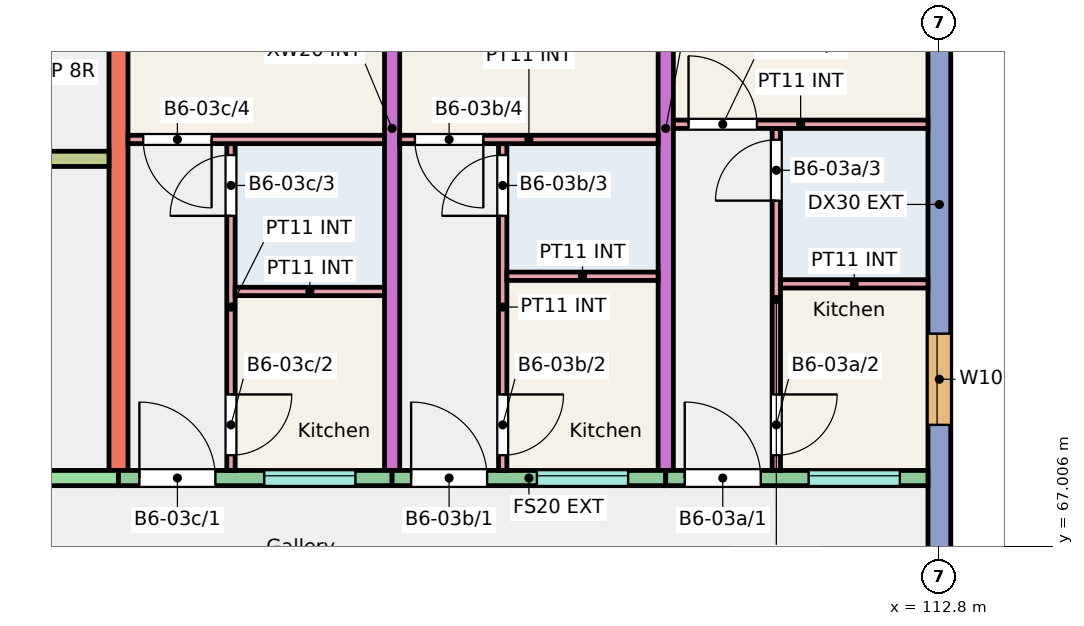
"""IFC4 building model, lengths in metres.
Left out: names, types, materials, properties, quantities, classifications, styles, units other than length and angle.
Written with IfcOpenShell. Run it as: python <this file> out.ifc"""

import sys

from ifc_helpers import new_model, si_unit, direction, frame, frame_2d, origin, place, context, subcontext, project, spatial, rectangle, extrude, element, fill, save


model = new_model("IFC4")
c1 = context("Model", 3, precision=1e-05, world=origin(), true_north=direction((0.0, 1.0)))
c2 = subcontext(c1, "Body", "Model", "MODEL_VIEW")
j1 = project(units=[si_unit("LENGTHUNIT", "METRE"), si_unit("PLANEANGLEUNIT", "RADIAN")], contexts=[c1])
p1 = place(None, origin())
s1 = spatial("IfcSite", under=j1, at=p1, CompositionType="ELEMENT")
p2 = place(p1, origin())
s2 = spatial("IfcBuilding", under=s1, at=p2, CompositionType="ELEMENT")
p3 = place(p2, frame((0.0, 0.0, 9.0)))
s3 = spatial("IfcBuildingStorey", under=s2, at=p3, CompositionType="ELEMENT", Elevation=9.0)
p4 = place(p3, frame((102.0, 68.0, 0.0), z_axis=(0.0, 0.0, 1.0), x_axis=(0.0, 1.0, 0.0)))
e1 = element("IfcWall", 1, at=p4, inside=s3, PredefinedType="SHEAR", context=c2, shape_type="SweptSolid", body=[
    extrude(rectangle(XDim=9.0, YDim=0.25, at=frame_2d((4.5, 0.0))), origin(), (0.0, 0.0, 1.0), 3.0),
])
for number, where, z_axis, x_axis in (
    (2, (105.6, 68.0, 0.0), (0.0, 0.0, 1.0), (0.0, 1.0, 0.0)),
    (3, (109.2, 68.0, 0.0), (0.0, 0.0, 1.0), (0.0, 1.0, 0.0)),
):
    element("IfcWall", number, at=place(p3, frame(where, z_axis=z_axis, x_axis=x_axis)), inside=s3, PredefinedType="SHEAR", context=c2, shape_type="SweptSolid", body=[
        extrude(rectangle(XDim=9.0, YDim=0.2, at=frame_2d((4.5, 0.0))), origin(), (0.0, 0.0, 1.0), 3.0),
    ])
p5 = place(p3, frame((112.8, 66.0, 0.0), z_axis=(0.0, 0.0, 1.0), x_axis=(0.0, 1.0, 0.0)))
e4 = element("IfcWall", 4, at=p5, inside=s3, PredefinedType="SHEAR", context=c2, shape_type="SweptSolid", body=[
    extrude(rectangle(XDim=11.0, YDim=0.3, at=frame_2d((5.5, 0.0))), origin(), (0.0, 0.0, 1.0), 3.0),
])
p6 = place(p5, frame((2.6, 0.0, 0.9)))
e5 = element("IfcOpeningElement", 5, at=p6, cuts=e4, PredefinedType="OPENING", context=c2, shape_type="SweptSolid", body=[
    extrude(rectangle(XDim=1.2, YDim=1.5, at=frame_2d((0.6, 0.75))), frame((0.0, 0.16, 0.0), z_axis=(0.0, -1.0, 0.0), x_axis=(1.0, 0.0, 0.0)), (0.0, 0.0, 1.0), 0.32),
])
p7 = place(p5, frame((7.905, 0.0, 0.9)))
e6 = element("IfcOpeningElement", 6, at=p7, cuts=e4, PredefinedType="OPENING", context=c2, shape_type="SweptSolid", body=[
    extrude(rectangle(XDim=1.8, YDim=1.5, at=frame_2d((0.9, 0.75))), frame((0.0, 0.16, 0.0), z_axis=(0.0, -1.0, 0.0), x_axis=(1.0, 0.0, 0.0)), (0.0, 0.0, 1.0), 0.32),
])
p8 = place(p3, frame((96.15, 67.9, 0.0), z_axis=(0.0, 0.0, 1.0), x_axis=(1.0, 0.0, 0.0)))
e7 = element("IfcWall", 7, at=p8, inside=s3, PredefinedType="SHEAR", context=c2, shape_type="SweptSolid", body=[
    extrude(rectangle(XDim=5.85, YDim=0.2, at=frame_2d((2.925, 0.0))), origin(), (0.0, 0.0, 1.0), 3.0),
])
p9 = place(p8, frame((2.312, 0.0, 0.0)))
e8 = element("IfcOpeningElement", 8, at=p9, cuts=e7, PredefinedType="OPENING", context=c2, shape_type="SweptSolid", body=[
    extrude(rectangle(XDim=1.1, YDim=2.1, at=frame_2d((0.55, 1.05))), frame((0.0, 0.11, 0.0), z_axis=(0.0, -1.0, 0.0), x_axis=(1.0, 0.0, 0.0)), (0.0, 0.0, 1.0), 0.22),
])
p10 = place(p3, frame((96.15, 72.1, 0.0), z_axis=(0.0, 0.0, 1.0), x_axis=(1.0, 0.0, 0.0)))
e9 = element("IfcWall", 9, at=p10, inside=s3, PredefinedType="SHEAR", context=c2, shape_type="SweptSolid", body=[
    extrude(rectangle(XDim=5.725, YDim=0.2, at=frame_2d((2.863, 0.0))), origin(), (0.0, 0.0, 1.0), 3.0),
])
p11 = place(p10, frame((3.775, 0.0, 0.0)))
e10 = element("IfcOpeningElement", 10, at=p11, cuts=e9, PredefinedType="OPENING", context=c2, shape_type="SweptSolid", body=[
    extrude(rectangle(XDim=1.0, YDim=2.1, at=frame_2d((0.5, 1.05))), frame((0.0, 0.11, 0.0), z_axis=(0.0, -1.0, 0.0), x_axis=(1.0, 0.0, 0.0)), (0.0, 0.0, 1.0), 0.22),
])
p12 = place(p10, frame((0.762, 0.0, 0.0)))
e11 = element("IfcOpeningElement", 11, at=p12, cuts=e9, PredefinedType="OPENING", context=c2, shape_type="SweptSolid", body=[
    extrude(rectangle(XDim=1.1, YDim=2.1, at=frame_2d((0.55, 1.05))), frame((0.0, 0.11, 0.0), z_axis=(0.0, -1.0, 0.0), x_axis=(1.0, 0.0, 0.0)), (0.0, 0.0, 1.0), 0.22),
])
p13 = place(p3, frame((102.0, 67.9, 0.0), z_axis=(0.0, 0.0, 1.0), x_axis=(1.0, 0.0, 0.0)))
e12 = element("IfcWall", 12, at=p13, inside=s3, PredefinedType="SOLIDWALL", context=c2, shape_type="SweptSolid", body=[
    extrude(rectangle(XDim=3.6, YDim=0.2, at=frame_2d((1.8, 0.0))), origin(), (0.0, 0.0, 1.0), 3.0),
])
p14 = place(p13, frame((1.917, 0.0, 1.1)))
e13 = element("IfcOpeningElement", 13, at=p14, cuts=e12, PredefinedType="OPENING", context=c2, shape_type="SweptSolid", body=[
    extrude(rectangle(XDim=1.2, YDim=1.3, at=frame_2d((0.6, 0.65))), frame((0.0, 0.11, 0.0), z_axis=(0.0, -1.0, 0.0), x_axis=(1.0, 0.0, 0.0)), (0.0, 0.0, 1.0), 0.22),
])
p15 = place(p13, frame((0.275, 0.0, 0.0)))
e14 = element("IfcOpeningElement", 14, at=p15, cuts=e12, PredefinedType="OPENING", context=c2, shape_type="SweptSolid", body=[
    extrude(rectangle(XDim=1.0, YDim=2.1, at=frame_2d((0.5, 1.05))), frame((0.0, 0.11, 0.0), z_axis=(0.0, -1.0, 0.0), x_axis=(1.0, 0.0, 0.0)), (0.0, 0.0, 1.0), 0.22),
])
p16 = place(p3, frame((105.6, 67.9, 0.0), z_axis=(0.0, 0.0, 1.0), x_axis=(1.0, 0.0, 0.0)))
e15 = element("IfcWall", 15, at=p16, inside=s3, PredefinedType="SOLIDWALL", context=c2, shape_type="SweptSolid", body=[
    extrude(rectangle(XDim=3.6, YDim=0.2, at=frame_2d((1.8, 0.0))), origin(), (0.0, 0.0, 1.0), 3.0),
])
p17 = place(p16, frame((1.905, 0.0, 1.1)))
e16 = element("IfcOpeningElement", 16, at=p17, cuts=e15, PredefinedType="OPENING", context=c2, shape_type="SweptSolid", body=[
    extrude(rectangle(XDim=1.2, YDim=1.3, at=frame_2d((0.6, 0.65))), frame((0.0, 0.11, 0.0), z_axis=(0.0, -1.0, 0.0), x_axis=(1.0, 0.0, 0.0)), (0.0, 0.0, 1.0), 0.22),
])
p18 = place(p16, frame((0.25, 0.0, 0.0)))
e17 = element("IfcOpeningElement", 17, at=p18, cuts=e15, PredefinedType="OPENING", context=c2, shape_type="SweptSolid", body=[
    extrude(rectangle(XDim=1.0, YDim=2.1, at=frame_2d((0.5, 1.05))), frame((0.0, 0.11, 0.0), z_axis=(0.0, -1.0, 0.0), x_axis=(1.0, 0.0, 0.0)), (0.0, 0.0, 1.0), 0.22),
])
p19 = place(p3, frame((109.2, 67.9, 0.0), z_axis=(0.0, 0.0, 1.0), x_axis=(1.0, 0.0, 0.0)))
e18 = element("IfcWall", 18, at=p19, inside=s3, PredefinedType="SOLIDWALL", context=c2, shape_type="SweptSolid", body=[
    extrude(rectangle(XDim=3.45, YDim=0.2, at=frame_2d((1.725, 0.0))), origin(), (0.0, 0.0, 1.0), 3.0),
])
p20 = place(p19, frame((1.88, 0.0, 1.1)))
e19 = element("IfcOpeningElement", 19, at=p20, cuts=e18, PredefinedType="OPENING", context=c2, shape_type="SweptSolid", body=[
    extrude(rectangle(XDim=1.2, YDim=1.3, at=frame_2d((0.6, 0.65))), frame((0.0, 0.11, 0.0), z_axis=(0.0, -1.0, 0.0), x_axis=(1.0, 0.0, 0.0)), (0.0, 0.0, 1.0), 0.22),
])
p21 = place(p19, frame((0.25, 0.0, 0.0)))
e20 = element("IfcOpeningElement", 20, at=p21, cuts=e18, PredefinedType="OPENING", context=c2, shape_type="SweptSolid", body=[
    extrude(rectangle(XDim=1.0, YDim=2.1, at=frame_2d((0.5, 1.05))), frame((0.0, 0.11, 0.0), z_axis=(0.0, -1.0, 0.0), x_axis=(1.0, 0.0, 0.0)), (0.0, 0.0, 1.0), 0.22),
])
p22 = place(p3, frame((110.655, 68.0, 0.0), z_axis=(0.0, 0.0, 1.0), x_axis=(0.0, 1.0, 0.0)))
e21 = element("IfcWall", 21, at=p22, inside=s3, PredefinedType="PARTITIONING", context=c2, shape_type="SweptSolid", body=[
    extrude(rectangle(XDim=4.5, YDim=0.11, at=frame_2d((2.25, 0.0))), origin(), (0.0, 0.0, 1.0), 2.8),
])
p23 = place(p22, frame((0.2, 0.0, 0.0)))
e22 = element("IfcOpeningElement", 22, at=p23, cuts=e21, PredefinedType="OPENING", context=c2, shape_type="SweptSolid", body=[
    extrude(rectangle(XDim=0.8, YDim=2.1, at=frame_2d((0.4, 1.05))), frame((0.0, 0.065, 0.0), z_axis=(0.0, -1.0, 0.0), x_axis=(1.0, 0.0, 0.0)), (0.0, 0.0, 1.0), 0.13),
])
p24 = place(p22, frame((3.55, 0.0, 0.0)))
e23 = element("IfcOpeningElement", 23, at=p24, cuts=e21, PredefinedType="OPENING", context=c2, shape_type="SweptSolid", body=[
    extrude(rectangle(XDim=0.8, YDim=2.1, at=frame_2d((0.4, 1.05))), frame((0.0, 0.065, 0.0), z_axis=(0.0, -1.0, 0.0), x_axis=(1.0, 0.0, 0.0)), (0.0, 0.0, 1.0), 0.13),
])
p25 = place(p3, frame((110.71, 70.455, 0.0), z_axis=(0.0, 0.0, 1.0), x_axis=(1.0, 0.0, 0.0)))
e24 = element("IfcWall", 24, at=p25, inside=s3, PredefinedType="PARTITIONING", context=c2, shape_type="SweptSolid", body=[
    extrude(rectangle(XDim=1.94, YDim=0.11, at=frame_2d((0.97, 0.0))), origin(), (0.0, 0.0, 1.0), 2.8),
])
p26 = place(p3, frame((109.3, 72.555, 0.0), z_axis=(0.0, 0.0, 1.0), x_axis=(1.0, 0.0, 0.0)))
e25 = element("IfcWall", 25, at=p26, inside=s3, PredefinedType="PARTITIONING", context=c2, shape_type="SweptSolid", body=[
    extrude(rectangle(XDim=3.35, YDim=0.11, at=frame_2d((1.675, 0.0))), origin(), (0.0, 0.0, 1.0), 2.8),
])
p27 = place(p26, frame((0.2, 0.0, 0.0)))
e26 = element("IfcOpeningElement", 26, at=p27, cuts=e25, PredefinedType="OPENING", context=c2, shape_type="SweptSolid", body=[
    extrude(rectangle(XDim=0.9, YDim=2.1, at=frame_2d((0.45, 1.05))), frame((0.0, 0.065, 0.0), z_axis=(0.0, -1.0, 0.0), x_axis=(1.0, 0.0, 0.0)), (0.0, 0.0, 1.0), 0.13),
])
p28 = place(p3, frame((107.055, 68.0, 0.0), z_axis=(0.0, 0.0, 1.0), x_axis=(0.0, 1.0, 0.0)))
e27 = element("IfcWall", 27, at=p28, inside=s3, PredefinedType="PARTITIONING", context=c2, shape_type="SweptSolid", body=[
    extrude(rectangle(XDim=4.3, YDim=0.11, at=frame_2d((2.15, 0.0))), origin(), (0.0, 0.0, 1.0), 2.8),
])
p29 = place(p28, frame((0.2, 0.0, 0.0)))
e28 = element("IfcOpeningElement", 28, at=p29, cuts=e27, PredefinedType="OPENING", context=c2, shape_type="SweptSolid", body=[
    extrude(rectangle(XDim=0.8, YDim=2.1, at=frame_2d((0.4, 1.05))), frame((0.0, 0.065, 0.0), z_axis=(0.0, -1.0, 0.0), x_axis=(1.0, 0.0, 0.0)), (0.0, 0.0, 1.0), 0.13),
])
p30 = place(p28, frame((3.35, 0.0, 0.0)))
e29 = element("IfcOpeningElement", 29, at=p30, cuts=e27, PredefinedType="OPENING", context=c2, shape_type="SweptSolid", body=[
    extrude(rectangle(XDim=0.8, YDim=2.1, at=frame_2d((0.4, 1.05))), frame((0.0, 0.065, 0.0), z_axis=(0.0, -1.0, 0.0), x_axis=(1.0, 0.0, 0.0)), (0.0, 0.0, 1.0), 0.13),
])
p31 = place(p3, frame((107.11, 70.555, 0.0), z_axis=(0.0, 0.0, 1.0), x_axis=(1.0, 0.0, 0.0)))
e30 = element("IfcWall", 30, at=p31, inside=s3, PredefinedType="PARTITIONING", context=c2, shape_type="SweptSolid", body=[
    extrude(rectangle(XDim=1.99, YDim=0.11, at=frame_2d((0.995, 0.0))), origin(), (0.0, 0.0, 1.0), 2.8),
])
p32 = place(p3, frame((105.7, 72.355, 0.0), z_axis=(0.0, 0.0, 1.0), x_axis=(1.0, 0.0, 0.0)))
e31 = element("IfcWall", 31, at=p32, inside=s3, PredefinedType="PARTITIONING", context=c2, shape_type="SweptSolid", body=[
    extrude(rectangle(XDim=3.4, YDim=0.11, at=frame_2d((1.7, 0.0))), origin(), (0.0, 0.0, 1.0), 2.8),
])
p33 = place(p32, frame((0.2, 0.0, 0.0)))
e32 = element("IfcOpeningElement", 32, at=p33, cuts=e31, PredefinedType="OPENING", context=c2, shape_type="SweptSolid", body=[
    extrude(rectangle(XDim=0.9, YDim=2.1, at=frame_2d((0.45, 1.05))), frame((0.0, 0.065, 0.0), z_axis=(0.0, -1.0, 0.0), x_axis=(1.0, 0.0, 0.0)), (0.0, 0.0, 1.0), 0.13),
])
p34 = place(p3, frame((103.48, 68.0, 0.0), z_axis=(0.0, 0.0, 1.0), x_axis=(0.0, 1.0, 0.0)))
e33 = element("IfcWall", 33, at=p34, inside=s3, PredefinedType="PARTITIONING", context=c2, shape_type="SweptSolid", body=[
    extrude(rectangle(XDim=4.3, YDim=0.11, at=frame_2d((2.15, 0.0))), origin(), (0.0, 0.0, 1.0), 2.8),
])
p35 = place(p34, frame((0.2, 0.0, 0.0)))
e34 = element("IfcOpeningElement", 34, at=p35, cuts=e33, PredefinedType="OPENING", context=c2, shape_type="SweptSolid", body=[
    extrude(rectangle(XDim=0.8, YDim=2.1, at=frame_2d((0.4, 1.05))), frame((0.0, 0.065, 0.0), z_axis=(0.0, -1.0, 0.0), x_axis=(1.0, 0.0, 0.0)), (0.0, 0.0, 1.0), 0.13),
])
p36 = place(p34, frame((3.35, 0.0, 0.0)))
e35 = element("IfcOpeningElement", 35, at=p36, cuts=e33, PredefinedType="OPENING", context=c2, shape_type="SweptSolid", body=[
    extrude(rectangle(XDim=0.8, YDim=2.1, at=frame_2d((0.4, 1.05))), frame((0.0, 0.065, 0.0), z_axis=(0.0, -1.0, 0.0), x_axis=(1.0, 0.0, 0.0)), (0.0, 0.0, 1.0), 0.13),
])
p37 = place(p3, frame((103.535, 70.355, 0.0), z_axis=(0.0, 0.0, 1.0), x_axis=(1.0, 0.0, 0.0)))
e36 = element("IfcWall", 36, at=p37, inside=s3, PredefinedType="PARTITIONING", context=c2, shape_type="SweptSolid", body=[
    extrude(rectangle(XDim=1.965, YDim=0.11, at=frame_2d((0.982, 0.0))), origin(), (0.0, 0.0, 1.0), 2.8),
])
p38 = place(p3, frame((102.125, 72.355, 0.0), z_axis=(0.0, 0.0, 1.0), x_axis=(1.0, 0.0, 0.0)))
e37 = element("IfcWall", 37, at=p38, inside=s3, PredefinedType="PARTITIONING", context=c2, shape_type="SweptSolid", body=[
    extrude(rectangle(XDim=3.375, YDim=0.11, at=frame_2d((1.688, 0.0))), origin(), (0.0, 0.0, 1.0), 2.8),
])
p39 = place(p38, frame((0.2, 0.0, 0.0)))
e38 = element("IfcOpeningElement", 38, at=p39, cuts=e37, PredefinedType="OPENING", context=c2, shape_type="SweptSolid", body=[
    extrude(rectangle(XDim=0.9, YDim=2.1, at=frame_2d((0.45, 1.05))), frame((0.0, 0.065, 0.0), z_axis=(0.0, -1.0, 0.0), x_axis=(1.0, 0.0, 0.0)), (0.0, 0.0, 1.0), 0.13),
])
p40 = place(p20, origin())
e39 = element("IfcWindow", 39, at=p40, inside=s3, PartitioningType="SINGLE_PANEL", PredefinedType="WINDOW", context=c2, shape_type="SweptSolid", body=[
    extrude(rectangle(XDim=1.2, YDim=1.3, at=frame_2d((0.6, 0.65))), frame((0.0, 0.06, 0.0), z_axis=(0.0, -1.0, 0.0), x_axis=(1.0, 0.0, 0.0)), (0.0, 0.0, 1.0), 0.06),
])
fill(e19, e39)
p41 = place(p6, origin())
e40 = element("IfcWindow", 40, at=p41, inside=s3, PartitioningType="SINGLE_PANEL", PredefinedType="WINDOW", context=c2, shape_type="SweptSolid", body=[
    extrude(rectangle(XDim=1.2, YDim=1.5, at=frame_2d((0.6, 0.75))), frame((0.0, 0.06, 0.0), z_axis=(0.0, -1.0, 0.0), x_axis=(1.0, 0.0, 0.0)), (0.0, 0.0, 1.0), 0.06),
])
fill(e5, e40)
p42 = place(p17, origin())
e41 = element("IfcWindow", 41, at=p42, inside=s3, PartitioningType="SINGLE_PANEL", PredefinedType="WINDOW", context=c2, shape_type="SweptSolid", body=[
    extrude(rectangle(XDim=1.2, YDim=1.3, at=frame_2d((0.6, 0.65))), frame((0.0, 0.06, 0.0), z_axis=(0.0, -1.0, 0.0), x_axis=(1.0, 0.0, 0.0)), (0.0, 0.0, 1.0), 0.06),
])
fill(e16, e41)
p43 = place(p14, origin())
e42 = element("IfcWindow", 42, at=p43, inside=s3, PartitioningType="SINGLE_PANEL", PredefinedType="WINDOW", context=c2, shape_type="SweptSolid", body=[
    extrude(rectangle(XDim=1.2, YDim=1.3, at=frame_2d((0.6, 0.65))), frame((0.0, 0.06, 0.0), z_axis=(0.0, -1.0, 0.0), x_axis=(1.0, 0.0, 0.0)), (0.0, 0.0, 1.0), 0.06),
])
fill(e13, e42)
p44 = place(p21, origin())
e43 = element("IfcDoor", 43, at=p44, inside=s3, OperationType="SINGLE_SWING_LEFT", PredefinedType="DOOR", context=c2, shape_type="SweptSolid", body=[
    extrude(rectangle(XDim=1.0, YDim=2.1, at=frame_2d((0.5, 1.05))), frame((0.0, 0.025, 0.0), z_axis=(0.0, -1.0, 0.0), x_axis=(1.0, 0.0, 0.0)), (0.0, 0.0, 1.0), 0.05),
])
fill(e20, e43)
p45 = place(p23, origin())
e44 = element("IfcDoor", 44, at=p45, inside=s3, OperationType="SINGLE_SWING_RIGHT", PredefinedType="DOOR", context=c2, shape_type="SweptSolid", body=[
    extrude(rectangle(XDim=0.8, YDim=2.1, at=frame_2d((0.4, 1.05))), frame((0.0, 0.025, 0.0), z_axis=(0.0, -1.0, 0.0), x_axis=(1.0, 0.0, 0.0)), (0.0, 0.0, 1.0), 0.05),
])
fill(e22, e44)
p46 = place(p24, origin())
e45 = element("IfcDoor", 45, at=p46, inside=s3, OperationType="SINGLE_SWING_LEFT", PredefinedType="DOOR", context=c2, shape_type="SweptSolid", body=[
    extrude(rectangle(XDim=0.8, YDim=2.1, at=frame_2d((0.4, 1.05))), frame((0.0, 0.025, 0.0), z_axis=(0.0, -1.0, 0.0), x_axis=(1.0, 0.0, 0.0)), (0.0, 0.0, 1.0), 0.05),
])
fill(e23, e45)
p47 = place(p27, origin())
e46 = element("IfcDoor", 46, at=p47, inside=s3, OperationType="SINGLE_SWING_LEFT", PredefinedType="DOOR", context=c2, shape_type="SweptSolid", body=[
    extrude(rectangle(XDim=0.9, YDim=2.1, at=frame_2d((0.45, 1.05))), frame((0.0, 0.025, 0.0), z_axis=(0.0, -1.0, 0.0), x_axis=(1.0, 0.0, 0.0)), (0.0, 0.0, 1.0), 0.05),
])
fill(e26, e46)
p48 = place(p18, origin())
e47 = element("IfcDoor", 47, at=p48, inside=s3, OperationType="SINGLE_SWING_LEFT", PredefinedType="DOOR", context=c2, shape_type="SweptSolid", body=[
    extrude(rectangle(XDim=1.0, YDim=2.1, at=frame_2d((0.5, 1.05))), frame((0.0, 0.025, 0.0), z_axis=(0.0, -1.0, 0.0), x_axis=(1.0, 0.0, 0.0)), (0.0, 0.0, 1.0), 0.05),
])
fill(e17, e47)
p49 = place(p29, origin())
e48 = element("IfcDoor", 48, at=p49, inside=s3, OperationType="SINGLE_SWING_RIGHT", PredefinedType="DOOR", context=c2, shape_type="SweptSolid", body=[
    extrude(rectangle(XDim=0.8, YDim=2.1, at=frame_2d((0.4, 1.05))), frame((0.0, 0.025, 0.0), z_axis=(0.0, -1.0, 0.0), x_axis=(1.0, 0.0, 0.0)), (0.0, 0.0, 1.0), 0.05),
])
fill(e28, e48)
p50 = place(p30, origin())
e49 = element("IfcDoor", 49, at=p50, inside=s3, OperationType="SINGLE_SWING_LEFT", PredefinedType="DOOR", context=c2, shape_type="SweptSolid", body=[
    extrude(rectangle(XDim=0.8, YDim=2.1, at=frame_2d((0.4, 1.05))), frame((0.0, 0.025, 0.0), z_axis=(0.0, -1.0, 0.0), x_axis=(1.0, 0.0, 0.0)), (0.0, 0.0, 1.0), 0.05),
])
fill(e29, e49)
p51 = place(p33, origin())
e50 = element("IfcDoor", 50, at=p51, inside=s3, OperationType="SINGLE_SWING_RIGHT", PredefinedType="DOOR", context=c2, shape_type="SweptSolid", body=[
    extrude(rectangle(XDim=0.9, YDim=2.1, at=frame_2d((0.45, 1.05))), frame((0.0, 0.025, 0.0), z_axis=(0.0, -1.0, 0.0), x_axis=(1.0, 0.0, 0.0)), (0.0, 0.0, 1.0), 0.05),
])
fill(e32, e50)
p52 = place(p15, origin())
e51 = element("IfcDoor", 51, at=p52, inside=s3, OperationType="SINGLE_SWING_LEFT", PredefinedType="DOOR", context=c2, shape_type="SweptSolid", body=[
    extrude(rectangle(XDim=1.0, YDim=2.1, at=frame_2d((0.5, 1.05))), frame((0.0, 0.025, 0.0), z_axis=(0.0, -1.0, 0.0), x_axis=(1.0, 0.0, 0.0)), (0.0, 0.0, 1.0), 0.05),
])
fill(e14, e51)
p53 = place(p35, origin())
e52 = element("IfcDoor", 52, at=p53, inside=s3, OperationType="SINGLE_SWING_RIGHT", PredefinedType="DOOR", context=c2, shape_type="SweptSolid", body=[
    extrude(rectangle(XDim=0.8, YDim=2.1, at=frame_2d((0.4, 1.05))), frame((0.0, 0.025, 0.0), z_axis=(0.0, -1.0, 0.0), x_axis=(1.0, 0.0, 0.0)), (0.0, 0.0, 1.0), 0.05),
])
fill(e34, e52)
p54 = place(p36, origin())
e53 = element("IfcDoor", 53, at=p54, inside=s3, OperationType="SINGLE_SWING_LEFT", PredefinedType="DOOR", context=c2, shape_type="SweptSolid", body=[
    extrude(rectangle(XDim=0.8, YDim=2.1, at=frame_2d((0.4, 1.05))), frame((0.0, 0.025, 0.0), z_axis=(0.0, -1.0, 0.0), x_axis=(1.0, 0.0, 0.0)), (0.0, 0.0, 1.0), 0.05),
])
fill(e35, e53)
p55 = place(p39, origin())
e54 = element("IfcDoor", 54, at=p55, inside=s3, OperationType="SINGLE_SWING_RIGHT", PredefinedType="DOOR", context=c2, shape_type="SweptSolid", body=[
    extrude(rectangle(XDim=0.9, YDim=2.1, at=frame_2d((0.45, 1.05))), frame((0.0, 0.025, 0.0), z_axis=(0.0, -1.0, 0.0), x_axis=(1.0, 0.0, 0.0)), (0.0, 0.0, 1.0), 0.05),
])
fill(e38, e54)
save(model, sys.argv[1])
